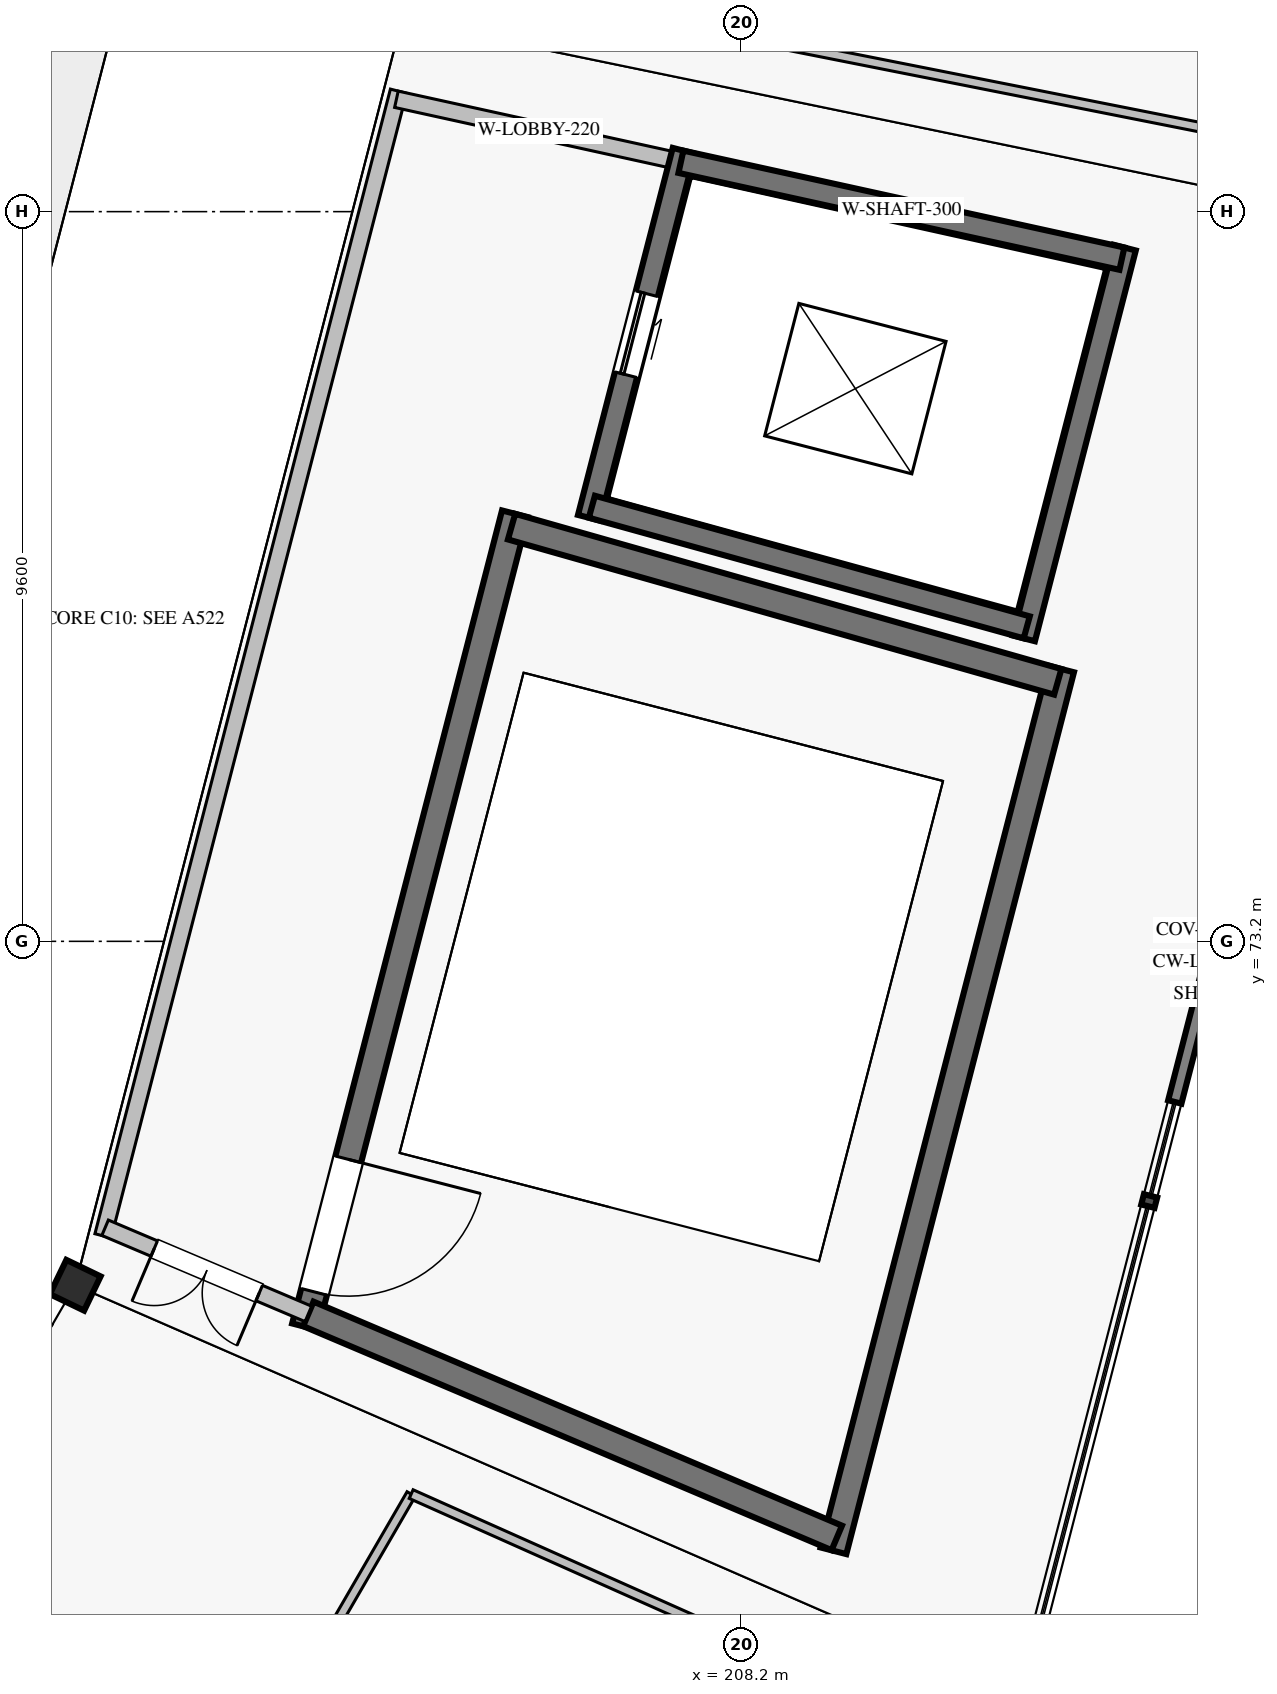
"""IFC4 building model, lengths in metres.
Left out: names, types, materials, properties, quantities, classifications, styles, units other than length and angle.
Written with IfcOpenShell. Run it as: python <this file> out.ifc"""

import sys

from ifc_helpers import new_model, si_unit, direction, frame, frame_2d, origin, origin_2d, place, context, subcontext, project, spatial, rectangle, hollow_rectangle, extrude, element, fill, save


model = new_model("IFC4")
c1 = context("Model", 3, precision=1e-05, world=origin(), true_north=direction((0.0, 1.0)))
c2 = subcontext(c1, "Body", "Model", "MODEL_VIEW")
j1 = project(units=[si_unit("LENGTHUNIT", "METRE"), si_unit("PLANEANGLEUNIT", "RADIAN")], contexts=[c1])
p1 = place(None, origin())
s1 = spatial("IfcSite", under=j1, at=p1, CompositionType="ELEMENT")
p2 = place(p1, origin())
s2 = spatial("IfcBuilding", under=s1, at=p2, CompositionType="ELEMENT")
p3 = place(p2, frame((0.0, 0.0, 20.4)))
s3 = spatial("IfcBuildingStorey", under=s2, at=p3, CompositionType="ELEMENT", Elevation=20.4)
p4 = place(p3, frame((199.441, 68.675, 0.0), z_axis=(0.0, 0.0, 1.0), x_axis=(0.900968867905, -0.433883739113, 0.0)))
e1 = element("IfcColumn", 1, at=p4, inside=s3, PredefinedType="COLUMN", context=c2, shape_type="SweptSolid", body=[
    extrude(hollow_rectangle(XDim=0.5, YDim=0.5, WallThickness=0.022, at=origin_2d()), origin(), (0.0, 0.0, 1.0), 5.44),
])
p5 = place(p3, frame((202.464, 68.129, 0.0), z_axis=(0.0, 0.0, 1.0), x_axis=(0.249959564539, 0.968256276042, 0.0)))
e2 = element("IfcWall", 2, at=p5, inside=s3, PredefinedType="SHEAR", context=c2, shape_type="SweptSolid", body=[
    extrude(rectangle(XDim=11.047, YDim=0.35, at=frame_2d((5.523, 0.0))), origin(), (0.0, 0.0, 1.0), 5.18),
])
p6 = place(p5, frame((0.475, 0.0, 0.0)))
e3 = element("IfcOpeningElement", 3, at=p6, cuts=e2, PredefinedType="OPENING", context=c2, shape_type="SweptSolid", body=[
    extrude(rectangle(XDim=1.8, YDim=2.2, at=frame_2d((0.9, 1.1))), frame((0.0, 0.185, 0.0), z_axis=(0.0, -1.0, 0.0), x_axis=(1.0, 0.0, 0.0)), (0.0, 0.0, 1.0), 0.37),
])
p7 = place(p3, frame((209.417, 65.182, 0.0), z_axis=(0.0, 0.0, 1.0), x_axis=(0.249969221583, 0.968253782983, 0.0)))
e4 = element("IfcWall", 4, at=p7, inside=s3, PredefinedType="SHEAR", context=c2, shape_type="SweptSolid", body=[
    extrude(rectangle(XDim=11.982, YDim=0.35, at=frame_2d((5.991, 0.0))), origin(), (0.0, 0.0, 1.0), 5.18),
])
p8 = place(p3, frame((202.508, 68.299, 0.0), z_axis=(0.0, 0.0, 1.0), x_axis=(0.920704667209, -0.390260061728, 0.0)))
e5 = element("IfcWall", 5, at=p8, inside=s3, PredefinedType="SHEAR", context=c2, shape_type="SweptSolid", body=[
    extrude(rectangle(XDim=7.552, YDim=0.35, at=frame_2d((3.776, 0.0))), origin(), (0.0, 0.0, 1.0), 5.18),
])
p9 = place(p3, frame((205.182, 78.656, 0.0), z_axis=(0.0, 0.0, 1.0), x_axis=(0.961945802461, -0.273240321195, 0.0)))
e6 = element("IfcWall", 6, at=p9, inside=s3, PredefinedType="SHEAR", context=c2, shape_type="SweptSolid", body=[
    extrude(rectangle(XDim=7.47, YDim=0.35, at=frame_2d((3.735, 0.0))), origin(), (0.0, 0.0, 1.0), 5.18),
])
p10 = place(p3, frame((206.201, 78.772, 0.0), z_axis=(0.0, 0.0, 1.0), x_axis=(0.249946120621, 0.968259746549, 0.0)))
e7 = element("IfcWall", 7, at=p10, inside=s3, PredefinedType="SHEAR", context=c2, shape_type="SweptSolid", body=[
    extrude(rectangle(XDim=4.987, YDim=0.3, at=frame_2d((2.494, 0.0))), origin(), (0.0, 0.0, 1.0), 5.18),
])
p11 = place(p10, frame((1.944, 0.0, 0.0)))
e8 = element("IfcOpeningElement", 8, at=p11, cuts=e7, PredefinedType="OPENING", context=c2, shape_type="SweptSolid", body=[
    extrude(rectangle(XDim=1.1, YDim=2.2, at=frame_2d((0.55, 1.1))), frame((0.0, 0.16, 0.0), z_axis=(0.0, -1.0, 0.0), x_axis=(1.0, 0.0, 0.0)), (0.0, 0.0, 1.0), 0.32),
])
p12 = place(p3, frame((211.923, 77.186, 0.0), z_axis=(0.0, 0.0, 1.0), x_axis=(0.249918349381, 0.968266914979, 0.0)))
e9 = element("IfcWall", 9, at=p12, inside=s3, PredefinedType="SHEAR", context=c2, shape_type="SweptSolid", body=[
    extrude(rectangle(XDim=5.309, YDim=0.3, at=frame_2d((2.655, 0.0))), origin(), (0.0, 0.0, 1.0), 5.18),
])
p13 = place(p3, frame((206.239, 78.917, 0.0), z_axis=(0.0, 0.0, 1.0), x_axis=(0.963642107639, -0.267196348002, 0.0)))
e10 = element("IfcWall", 10, at=p13, inside=s3, PredefinedType="SHEAR", context=c2, shape_type="SweptSolid", body=[
    extrude(rectangle(XDim=5.937, YDim=0.3, at=frame_2d((2.969, 0.0))), origin(), (0.0, 0.0, 1.0), 5.18),
])
p14 = place(p3, frame((207.41, 83.456, 0.0), z_axis=(0.0, 0.0, 1.0), x_axis=(0.976707381947, -0.214575604509, 0.0)))
e11 = element("IfcWall", 11, at=p14, inside=s3, PredefinedType="SHEAR", context=c2, shape_type="SweptSolid", body=[
    extrude(rectangle(XDim=5.94, YDim=0.3, at=frame_2d((2.97, 0.0))), origin(), (0.0, 0.0, 1.0), 5.18),
])
p15 = place(p3, frame((199.807, 69.325, 0.0), z_axis=(0.0, 0.0, 1.0), x_axis=(0.249963472505, 0.968255267176, 0.0)))
e12 = element("IfcWall", 12, at=p15, inside=s3, PredefinedType="SOLIDWALL", context=c2, shape_type="SweptSolid", body=[
    extrude(rectangle(XDim=15.553, YDim=0.22, at=frame_2d((7.776, 0.0))), origin(), (0.0, 0.0, 1.0), 5.18),
])
p16 = place(p3, frame((199.834, 69.432, 0.0), z_axis=(0.0, 0.0, 1.0), x_axis=(0.920711790761, -0.390243255361, 0.0)))
e13 = element("IfcWall", 13, at=p16, inside=s3, PredefinedType="SOLIDWALL", context=c2, shape_type="SweptSolid", body=[
    extrude(rectangle(XDim=2.904, YDim=0.22, at=frame_2d((1.452, 0.0))), origin(), (0.0, 0.0, 1.0), 5.18),
])
p17 = place(p16, frame((0.702, 0.0, 0.0)))
e14 = element("IfcOpeningElement", 14, at=p17, cuts=e13, PredefinedType="OPENING", context=c2, shape_type="SweptSolid", body=[
    extrude(rectangle(XDim=1.5, YDim=2.2, at=frame_2d((0.75, 1.1))), frame((0.0, 0.12, 0.0), z_axis=(0.0, -1.0, 0.0), x_axis=(1.0, 0.0, 0.0)), (0.0, 0.0, 1.0), 0.24),
])
p18 = place(p3, frame((203.667, 84.278, 0.0), z_axis=(0.0, 0.0, 1.0), x_axis=(0.976714725209, -0.214542176645, 0.0)))
e15 = element("IfcWall", 15, at=p18, inside=s3, PredefinedType="SOLIDWALL", context=c2, shape_type="SweptSolid", body=[
    extrude(rectangle(XDim=3.833, YDim=0.22, at=frame_2d((1.917, 0.0))), origin(), (0.0, 0.0, 1.0), 5.18),
])
p19 = place(p3, frame((195.125, 50.861, 0.0), z_axis=(0.0, 0.0, 1.0), x_axis=(0.501622425841, 0.865086667273, 0.0)))
e16 = element("IfcWall", 16, at=p19, inside=s3, PredefinedType="PARTITIONING", context=c2, shape_type="SweptSolid", body=[
    extrude(rectangle(XDim=17.417, YDim=0.125, at=frame_2d((8.708, 0.0))), origin(), (0.0, 0.0, 1.0), 4.5),
])
p20 = place(p19, frame((8.098, 0.0, 0.0)))
e17 = element("IfcOpeningElement", 17, at=p20, cuts=e16, PredefinedType="OPENING", context=c2, shape_type="SweptSolid", body=[
    extrude(rectangle(XDim=1.22, YDim=2.15, at=frame_2d((0.61, 1.075))), frame((0.0, 0.073, 0.0), z_axis=(0.0, -1.0, 0.0), x_axis=(1.0, 0.0, 0.0)), (0.0, 0.0, 1.0), 0.145),
])
p21 = place(p3, frame((203.861, 65.928, 0.0), z_axis=(0.0, 0.0, 1.0), x_axis=(0.913244381211, -0.407412199359, 0.0)))
e18 = element("IfcWall", 18, at=p21, inside=s3, PredefinedType="PARTITIONING", context=c2, shape_type="SweptSolid", body=[
    extrude(rectangle(XDim=7.556, YDim=0.125, at=frame_2d((3.778, 0.0))), origin(), (0.0, 0.0, 1.0), 4.5),
])
p22 = place(p3, frame((208.848, 84.98, 0.0), z_axis=(0.0, 0.0, 1.0), x_axis=(0.980903700741, -0.194494035571, 0.0)))
e19 = element("IfcWall", 19, at=p22, inside=s3, PredefinedType="PARTITIONING", context=c2, shape_type="SweptSolid", body=[
    extrude(rectangle(XDim=7.469, YDim=0.125, at=frame_2d((3.734, 0.0))), origin(), (0.0, 0.0, 1.0), 4.5),
])
p23 = place(p6, frame((1.8, 0.0, 0.0), z_axis=(0.0, 0.0, 1.0), x_axis=(-1.0, 0.0, 0.0)))
e20 = element("IfcDoor", 20, at=p23, inside=s3, OperationType="SINGLE_SWING_LEFT", PredefinedType="DOOR", context=c2, shape_type="SweptSolid", body=[
    extrude(rectangle(XDim=1.8, YDim=2.2, at=frame_2d((0.9, 1.1))), frame((0.0, 0.025, 0.0), z_axis=(0.0, -1.0, 0.0), x_axis=(1.0, 0.0, 0.0)), (0.0, 0.0, 1.0), 0.05),
])
fill(e3, e20)
p24 = place(p11, origin())
e21 = element("IfcDoor", 21, at=p24, inside=s3, OperationType="SLIDING_TO_RIGHT", PredefinedType="DOOR", context=c2, shape_type="SweptSolid", body=[
    extrude(rectangle(XDim=1.1, YDim=2.2, at=frame_2d((0.55, 1.1))), frame((0.0, 0.025, 0.0), z_axis=(0.0, -1.0, 0.0), x_axis=(1.0, 0.0, 0.0)), (0.0, 0.0, 1.0), 0.05),
])
fill(e8, e21)
p25 = place(p17, frame((1.5, 0.0, 0.0), z_axis=(0.0, 0.0, 1.0), x_axis=(-1.0, 0.0, 0.0)))
e22 = element("IfcDoor", 22, at=p25, inside=s3, OperationType="DOUBLE_DOOR_SINGLE_SWING", PredefinedType="DOOR", context=c2, shape_type="SweptSolid", body=[
    extrude(rectangle(XDim=1.5, YDim=2.2, at=frame_2d((0.75, 1.1))), frame((0.0, 0.025, 0.0), z_axis=(0.0, -1.0, 0.0), x_axis=(1.0, 0.0, 0.0)), (0.0, 0.0, 1.0), 0.05),
])
fill(e14, e22)
save(model, sys.argv[1])
